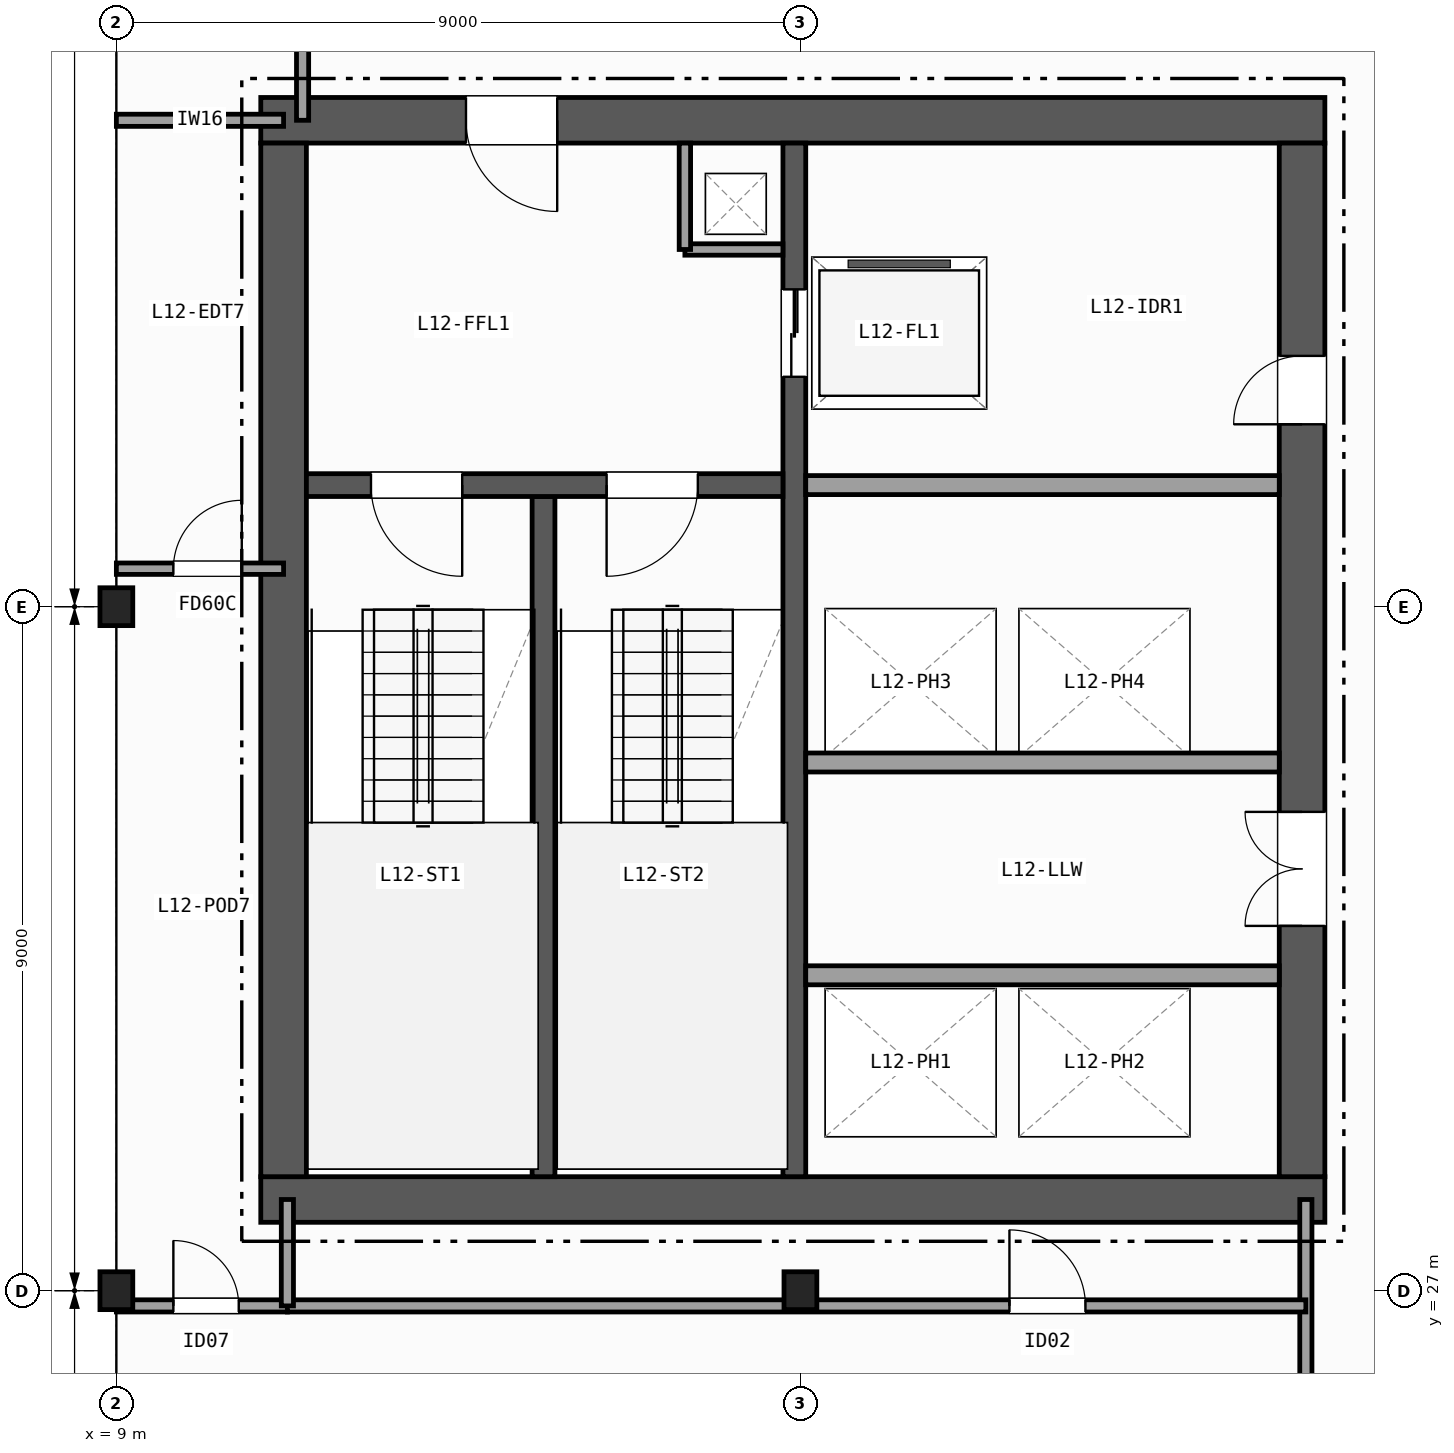
"""IFC4 building model, lengths in metres.
Left out: names, types, materials, properties, quantities, classifications, styles, units other than length and angle.
Written with IfcOpenShell. Run it as: python <this file> out.ifc"""

import sys

from ifc_helpers import new_model, si_unit, direction, frame, frame_2d, origin, origin_2d, place, context, subcontext, project, spatial, rectangle, i_section, extrude, element, fill, save


model = new_model("IFC4")
c1 = context("Model", 3, precision=1e-05, world=origin(), true_north=direction((0.0, 1.0)))
c2 = subcontext(c1, "Body", "Model", "MODEL_VIEW")
j1 = project(units=[si_unit("LENGTHUNIT", "METRE"), si_unit("PLANEANGLEUNIT", "RADIAN")], contexts=[c1])
p1 = place(None, origin())
s1 = spatial("IfcSite", under=j1, at=p1, CompositionType="ELEMENT")
p2 = place(p1, origin())
s2 = spatial("IfcBuilding", under=s1, at=p2, CompositionType="ELEMENT")
p3 = place(p2, frame((0.0, 0.0, 54.5)))
s3 = spatial("IfcBuildingStorey", under=s2, at=p3, CompositionType="ELEMENT", Elevation=54.5)
for number, where, z_axis, x_axis in (
    (1, (9.0, 27.0, 0.0), (0.0, 0.0, 1.0), (1.0, 0.0, 0.0)),
    (2, (9.0, 36.0, 0.0), (0.0, 0.0, 1.0), (1.0, 0.0, 0.0)),
    (3, (18.0, 27.0, 0.0), (0.0, 0.0, 1.0), (1.0, 0.0, 0.0)),
):
    element("IfcColumn", number, at=place(p3, frame(where, z_axis=z_axis, x_axis=x_axis)), inside=s3, PredefinedType="COLUMN", context=c2, shape_type="SweptSolid", body=[
        extrude(i_section(OverallWidth=0.432, OverallDepth=0.498, WebThickness=0.056, FlangeThickness=0.089, FilletRadius=0.015, at=origin_2d()), origin(), (0.0, 0.0, 1.0), 3.7),
    ])
p4 = place(p3, frame((10.9, 28.2, 0.0), z_axis=(0.0, 0.0, 1.0), x_axis=(1.0, 0.0, 0.0)))
e4 = element("IfcWall", 4, at=p4, inside=s3, PredefinedType="SHEAR", context=c2, shape_type="SweptSolid", body=[
    extrude(rectangle(XDim=14.0, YDim=0.6, at=frame_2d((7.0, 0.0))), origin(), (0.0, 0.0, 1.0), 3.42),
])
p5 = place(p3, frame((24.9, 42.4, 0.0), z_axis=(0.0, 0.0, 1.0), x_axis=(-1.0, 0.0, 0.0)))
e5 = element("IfcWall", 5, at=p5, inside=s3, PredefinedType="SHEAR", context=c2, shape_type="SweptSolid", body=[
    extrude(rectangle(XDim=14.0, YDim=0.6, at=frame_2d((7.0, 0.0))), origin(), (0.0, 0.0, 1.0), 3.42),
])
p6 = place(p5, frame((10.1, 0.0, 0.0)))
e6 = element("IfcOpeningElement", 6, at=p6, cuts=e5, PredefinedType="OPENING", context=c2, shape_type="SweptSolid", body=[
    extrude(rectangle(XDim=1.2, YDim=2.15, at=frame_2d((0.6, 1.075))), frame((0.0, 0.31, 0.0), z_axis=(0.0, -1.0, 0.0), x_axis=(1.0, 0.0, 0.0)), (0.0, 0.0, 1.0), 0.62),
])
p7 = place(p3, frame((11.2, 42.1, 0.0), z_axis=(0.0, 0.0, 1.0), x_axis=(0.0, -1.0, 0.0)))
e7 = element("IfcWall", 7, at=p7, inside=s3, PredefinedType="SHEAR", context=c2, shape_type="SweptSolid", body=[
    extrude(rectangle(XDim=13.6, YDim=0.6, at=frame_2d((6.8, 0.0))), origin(), (0.0, 0.0, 1.0), 3.42),
])
p8 = place(p3, frame((24.6, 28.5, 0.0), z_axis=(0.0, 0.0, 1.0), x_axis=(0.0, 1.0, 0.0)))
e8 = element("IfcWall", 8, at=p8, inside=s3, PredefinedType="SHEAR", context=c2, shape_type="SweptSolid", body=[
    extrude(rectangle(XDim=13.6, YDim=0.6, at=frame_2d((6.8, 0.0))), origin(), (0.0, 0.0, 1.0), 3.42),
])
p9 = place(p8, frame((3.3, 0.0, 0.0)))
e9 = element("IfcOpeningElement", 9, at=p9, cuts=e8, PredefinedType="OPENING", context=c2, shape_type="SweptSolid", body=[
    extrude(rectangle(XDim=1.5, YDim=2.2, at=frame_2d((0.75, 1.1))), frame((0.0, 0.31, 0.0), z_axis=(0.0, -1.0, 0.0), x_axis=(1.0, 0.0, 0.0)), (0.0, 0.0, 1.0), 0.62),
])
p10 = place(p8, frame((9.9, 0.0, 0.0)))
e10 = element("IfcOpeningElement", 10, at=p10, cuts=e8, PredefinedType="OPENING", context=c2, shape_type="SweptSolid", body=[
    extrude(rectangle(XDim=0.9, YDim=2.1, at=frame_2d((0.45, 1.05))), frame((0.0, 0.31, 0.0), z_axis=(0.0, -1.0, 0.0), x_axis=(1.0, 0.0, 0.0)), (0.0, 0.0, 1.0), 0.62),
])
p11 = place(p3, frame((14.62, 28.5, 0.0), z_axis=(0.0, 0.0, 1.0), x_axis=(0.0, 1.0, 0.0)))
e11 = element("IfcWall", 11, at=p11, inside=s3, PredefinedType="SHEAR", context=c2, shape_type="SweptSolid", body=[
    extrude(rectangle(XDim=8.95, YDim=0.3, at=frame_2d((4.475, 0.0))), origin(), (0.0, 0.0, 1.0), 3.42),
])
p12 = place(p3, frame((17.92, 42.1, 0.0), z_axis=(0.0, 0.0, 1.0), x_axis=(0.0, -1.0, 0.0)))
e12 = element("IfcWall", 12, at=p12, inside=s3, PredefinedType="SHEAR", context=c2, shape_type="SweptSolid", body=[
    extrude(rectangle(XDim=13.6, YDim=0.3, at=frame_2d((6.8, 0.0))), origin(), (0.0, 0.0, 1.0), 3.42),
])
p13 = place(p12, frame((1.925, 0.0, 0.0)))
e13 = element("IfcOpeningElement", 13, at=p13, cuts=e12, PredefinedType="OPENING", context=c2, shape_type="SweptSolid", body=[
    extrude(rectangle(XDim=1.15, YDim=2.15, at=frame_2d((0.575, 1.075))), frame((0.0, 0.16, 0.0), z_axis=(0.0, -1.0, 0.0), x_axis=(1.0, 0.0, 0.0)), (0.0, 0.0, 1.0), 0.32),
])
p14 = place(p3, frame((17.77, 37.6, 0.0), z_axis=(0.0, 0.0, 1.0), x_axis=(-1.0, 0.0, 0.0)))
e14 = element("IfcWall", 14, at=p14, inside=s3, PredefinedType="SHEAR", context=c2, shape_type="SweptSolid", body=[
    extrude(rectangle(XDim=6.27, YDim=0.3, at=frame_2d((3.135, 0.0))), origin(), (0.0, 0.0, 1.0), 3.42),
])
p15 = place(p14, frame((4.22, 0.0, 0.0)))
e15 = element("IfcOpeningElement", 15, at=p15, cuts=e14, PredefinedType="OPENING", context=c2, shape_type="SweptSolid", body=[
    extrude(rectangle(XDim=1.2, YDim=2.15, at=frame_2d((0.6, 1.075))), frame((0.0, 0.16, 0.0), z_axis=(0.0, -1.0, 0.0), x_axis=(1.0, 0.0, 0.0)), (0.0, 0.0, 1.0), 0.32),
])
p16 = place(p14, frame((1.12, 0.0, 0.0)))
e16 = element("IfcOpeningElement", 16, at=p16, cuts=e14, PredefinedType="OPENING", context=c2, shape_type="SweptSolid", body=[
    extrude(rectangle(XDim=1.2, YDim=2.15, at=frame_2d((0.6, 1.075))), frame((0.0, 0.16, 0.0), z_axis=(0.0, -1.0, 0.0), x_axis=(1.0, 0.0, 0.0)), (0.0, 0.0, 1.0), 0.32),
])
p17 = place(p3, frame((16.48, 40.7, 0.0), z_axis=(0.0, 0.0, 1.0), x_axis=(1.0, 0.0, 0.0)))
e17 = element("IfcWall", 17, at=p17, inside=s3, PredefinedType="PARTITIONING", context=c2, shape_type="SweptSolid", body=[
    extrude(rectangle(XDim=1.29, YDim=0.15, at=frame_2d((0.645, 0.0))), origin(), (0.0, 0.0, 1.0), 3.42),
])
p18 = place(p3, frame((16.48, 40.7, 0.0), z_axis=(0.0, 0.0, 1.0), x_axis=(0.0, 1.0, 0.0)))
e18 = element("IfcWall", 18, at=p18, inside=s3, PredefinedType="PARTITIONING", context=c2, shape_type="SweptSolid", body=[
    extrude(rectangle(XDim=1.4, YDim=0.15, at=frame_2d((0.7, 0.0))), origin(), (0.0, 0.0, 1.0), 3.42),
])
for number, where, z_axis, x_axis in (
    (19, (18.07, 37.6, 0.0), (0.0, 0.0, 1.0), (1.0, 0.0, 0.0)),
    (20, (18.07, 31.15, 0.0), (0.0, 0.0, 1.0), (1.0, 0.0, 0.0)),
    (21, (24.3, 33.95, 0.0), (0.0, 0.0, 1.0), (-1.0, 0.0, 0.0)),
):
    element("IfcWall", number, at=place(p3, frame(where, z_axis=z_axis, x_axis=x_axis)), inside=s3, PredefinedType="PARTITIONING", context=c2, shape_type="SweptSolid", body=[
        extrude(rectangle(XDim=6.23, YDim=0.25, at=frame_2d((3.115, 0.0))), origin(), (0.0, 0.0, 1.0), 3.42),
    ])
p19 = place(p3, frame((9.0, 26.8, 0.0), z_axis=(0.0, 0.0, 1.0), x_axis=(1.0, 0.0, 0.0)))
e22 = element("IfcWall", 22, at=p19, inside=s3, PredefinedType="PARTITIONING", context=c2, shape_type="SweptSolid", body=[
    extrude(rectangle(XDim=2.25, YDim=0.16, at=frame_2d((1.125, 0.0))), origin(), (0.0, 0.0, 1.0), 2.627),
])
p20 = place(p19, frame((0.75, 0.0, 0.0)))
e23 = element("IfcOpeningElement", 23, at=p20, cuts=e22, PredefinedType="OPENING", context=c2, shape_type="SweptSolid", body=[
    extrude(rectangle(XDim=0.86, YDim=2.05, at=frame_2d((0.43, 1.025))), frame((0.0, 0.09, 0.0), z_axis=(0.0, -1.0, 0.0), x_axis=(1.0, 0.0, 0.0)), (0.0, 0.0, 1.0), 0.18),
])
p21 = place(p3, frame((9.0, 42.4, 0.0), z_axis=(0.0, 0.0, 1.0), x_axis=(1.0, 0.0, 0.0)))
e24 = element("IfcWall", 24, at=p21, inside=s3, PredefinedType="PARTITIONING", context=c2, shape_type="SweptSolid", body=[
    extrude(rectangle(XDim=2.2, YDim=0.16, at=frame_2d((1.1, 0.0))), origin(), (0.0, 0.0, 1.0), 2.627),
])
p22 = place(p3, frame((11.45, 42.4, 0.0), z_axis=(0.0, 0.0, 1.0), x_axis=(0.0, 1.0, 0.0)))
e25 = element("IfcWall", 25, at=p22, inside=s3, PredefinedType="PARTITIONING", context=c2, shape_type="SweptSolid", body=[
    extrude(rectangle(XDim=2.1, YDim=0.16, at=frame_2d((1.05, 0.0))), origin(), (0.0, 0.0, 1.0), 3.42),
])
p23 = place(p3, frame((9.0, 36.5, 0.0), z_axis=(0.0, 0.0, 1.0), x_axis=(1.0, 0.0, 0.0)))
e26 = element("IfcWall", 26, at=p23, inside=s3, PredefinedType="PARTITIONING", context=c2, shape_type="SweptSolid", body=[
    extrude(rectangle(XDim=2.2, YDim=0.15, at=frame_2d((1.1, 0.0))), origin(), (0.0, 0.0, 1.0), 2.627),
])
p24 = place(p23, frame((0.75, 0.0, 0.0)))
e27 = element("IfcOpeningElement", 27, at=p24, cuts=e26, PredefinedType="OPENING", context=c2, shape_type="SweptSolid", body=[
    extrude(rectangle(XDim=0.9, YDim=2.1, at=frame_2d((0.45, 1.05))), frame((0.0, 0.085, 0.0), z_axis=(0.0, -1.0, 0.0), x_axis=(1.0, 0.0, 0.0)), (0.0, 0.0, 1.0), 0.17),
])
p25 = place(p3, frame((24.65, 9.0, 0.0), z_axis=(0.0, 0.0, 1.0), x_axis=(0.0, 1.0, 0.0)))
e28 = element("IfcWall", 28, at=p25, inside=s3, PredefinedType="PARTITIONING", context=c2, shape_type="SweptSolid", body=[
    extrude(rectangle(XDim=19.2, YDim=0.16, at=frame_2d((9.6, 0.0))), origin(), (0.0, 0.0, 1.0), 2.627),
])
p26 = place(p25, frame((12.2, 0.0, 0.0)))
e29 = element("IfcOpeningElement", 29, at=p26, cuts=e28, PredefinedType="OPENING", context=c2, shape_type="SweptSolid", body=[
    extrude(rectangle(XDim=1.05, YDim=2.15, at=frame_2d((0.525, 1.075))), frame((0.0, 0.09, 0.0), z_axis=(0.0, -1.0, 0.0), x_axis=(1.0, 0.0, 0.0)), (0.0, 0.0, 1.0), 0.18),
])
p27 = place(p25, frame((4.2, 0.0, 0.0)))
e30 = element("IfcOpeningElement", 30, at=p27, cuts=e28, PredefinedType="OPENING", context=c2, shape_type="SweptSolid", body=[
    extrude(rectangle(XDim=1.2, YDim=2.15, at=frame_2d((0.6, 1.075))), frame((0.0, 0.09, 0.0), z_axis=(0.0, -1.0, 0.0), x_axis=(1.0, 0.0, 0.0)), (0.0, 0.0, 1.0), 0.18),
])
p28 = place(p3, frame((11.25, 26.8, 0.0), z_axis=(0.0, 0.0, 1.0), x_axis=(1.0, 0.0, 0.0)))
e31 = element("IfcWall", 31, at=p28, inside=s3, PredefinedType="PARTITIONING", context=c2, shape_type="SweptSolid", body=[
    extrude(rectangle(XDim=13.4, YDim=0.16, at=frame_2d((6.7, 0.0))), origin(), (0.0, 0.0, 1.0), 2.789),
])
p29 = place(p28, frame((9.5, 0.0, 0.0)))
e32 = element("IfcOpeningElement", 32, at=p29, cuts=e31, PredefinedType="OPENING", context=c2, shape_type="SweptSolid", body=[
    extrude(rectangle(XDim=1.0, YDim=2.1, at=frame_2d((0.5, 1.05))), frame((0.0, 0.09, 0.0), z_axis=(0.0, -1.0, 0.0), x_axis=(1.0, 0.0, 0.0)), (0.0, 0.0, 1.0), 0.18),
])
p30 = place(p3, frame((11.25, 26.8, 0.0), z_axis=(0.0, 0.0, 1.0), x_axis=(0.0, 1.0, 0.0)))
e33 = element("IfcWall", 33, at=p30, inside=s3, PredefinedType="PARTITIONING", context=c2, shape_type="SweptSolid", body=[
    extrude(rectangle(XDim=1.4, YDim=0.16, at=frame_2d((0.7, 0.0))), origin(), (0.0, 0.0, 1.0), 2.789),
])
p31 = place(p15, origin())
e34 = element("IfcDoor", 34, at=p31, inside=s3, OperationType="SINGLE_SWING_LEFT", PredefinedType="DOOR", context=c2, shape_type="SweptSolid", body=[
    extrude(rectangle(XDim=1.2, YDim=2.15, at=frame_2d((0.6, 1.075))), frame((0.0, 0.025, 0.0), z_axis=(0.0, -1.0, 0.0), x_axis=(1.0, 0.0, 0.0)), (0.0, 0.0, 1.0), 0.05),
])
fill(e15, e34)
p32 = place(p16, origin())
e35 = element("IfcDoor", 35, at=p32, inside=s3, OperationType="SINGLE_SWING_RIGHT", PredefinedType="DOOR", context=c2, shape_type="SweptSolid", body=[
    extrude(rectangle(XDim=1.2, YDim=2.15, at=frame_2d((0.6, 1.075))), frame((0.0, 0.025, 0.0), z_axis=(0.0, -1.0, 0.0), x_axis=(1.0, 0.0, 0.0)), (0.0, 0.0, 1.0), 0.05),
])
fill(e16, e35)
p33 = place(p9, origin())
e36 = element("IfcDoor", 36, at=p33, inside=s3, OperationType="DOUBLE_DOOR_SINGLE_SWING", PredefinedType="DOOR", context=c2, shape_type="SweptSolid", body=[
    extrude(rectangle(XDim=1.5, YDim=2.2, at=frame_2d((0.75, 1.1))), frame((0.0, 0.025, 0.0), z_axis=(0.0, -1.0, 0.0), x_axis=(1.0, 0.0, 0.0)), (0.0, 0.0, 1.0), 0.05),
])
fill(e9, e36)
p34 = place(p6, origin())
e37 = element("IfcDoor", 37, at=p34, inside=s3, OperationType="SINGLE_SWING_LEFT", PredefinedType="DOOR", context=c2, shape_type="SweptSolid", body=[
    extrude(rectangle(XDim=1.2, YDim=2.15, at=frame_2d((0.6, 1.075))), frame((0.0, 0.025, 0.0), z_axis=(0.0, -1.0, 0.0), x_axis=(1.0, 0.0, 0.0)), (0.0, 0.0, 1.0), 0.05),
])
fill(e6, e37)
p35 = place(p10, origin())
e38 = element("IfcDoor", 38, at=p35, inside=s3, OperationType="SINGLE_SWING_LEFT", PredefinedType="DOOR", context=c2, shape_type="SweptSolid", body=[
    extrude(rectangle(XDim=0.9, YDim=2.1, at=frame_2d((0.45, 1.05))), frame((0.0, 0.025, 0.0), z_axis=(0.0, -1.0, 0.0), x_axis=(1.0, 0.0, 0.0)), (0.0, 0.0, 1.0), 0.05),
])
fill(e10, e38)
p36 = place(p13, origin())
e39 = element("IfcDoor", 39, at=p36, inside=s3, OperationType="DOUBLE_DOOR_SLIDING", PredefinedType="DOOR", context=c2, shape_type="SweptSolid", body=[
    extrude(rectangle(XDim=1.15, YDim=2.15, at=frame_2d((0.575, 1.075))), frame((0.0, 0.025, 0.0), z_axis=(0.0, -1.0, 0.0), x_axis=(1.0, 0.0, 0.0)), (0.0, 0.0, 1.0), 0.05),
])
fill(e13, e39)
p37 = place(p20, origin())
e40 = element("IfcDoor", 40, at=p37, inside=s3, OperationType="SINGLE_SWING_LEFT", PredefinedType="DOOR", context=c2, shape_type="SweptSolid", body=[
    extrude(rectangle(XDim=0.86, YDim=2.05, at=frame_2d((0.43, 1.025))), frame((0.0, 0.025, 0.0), z_axis=(0.0, -1.0, 0.0), x_axis=(1.0, 0.0, 0.0)), (0.0, 0.0, 1.0), 0.05),
])
fill(e23, e40)
p38 = place(p24, origin())
e41 = element("IfcDoor", 41, at=p38, inside=s3, OperationType="SINGLE_SWING_RIGHT", PredefinedType="DOOR", context=c2, shape_type="SweptSolid", body=[
    extrude(rectangle(XDim=0.9, YDim=2.1, at=frame_2d((0.45, 1.05))), frame((0.0, 0.025, 0.0), z_axis=(0.0, -1.0, 0.0), x_axis=(1.0, 0.0, 0.0)), (0.0, 0.0, 1.0), 0.05),
])
fill(e27, e41)
p39 = place(p29, origin())
e42 = element("IfcDoor", 42, at=p39, inside=s3, OperationType="SINGLE_SWING_LEFT", PredefinedType="DOOR", context=c2, shape_type="SweptSolid", body=[
    extrude(rectangle(XDim=1.0, YDim=2.1, at=frame_2d((0.5, 1.05))), frame((0.0, 0.025, 0.0), z_axis=(0.0, -1.0, 0.0), x_axis=(1.0, 0.0, 0.0)), (0.0, 0.0, 1.0), 0.05),
])
fill(e32, e42)
save(model, sys.argv[1])
